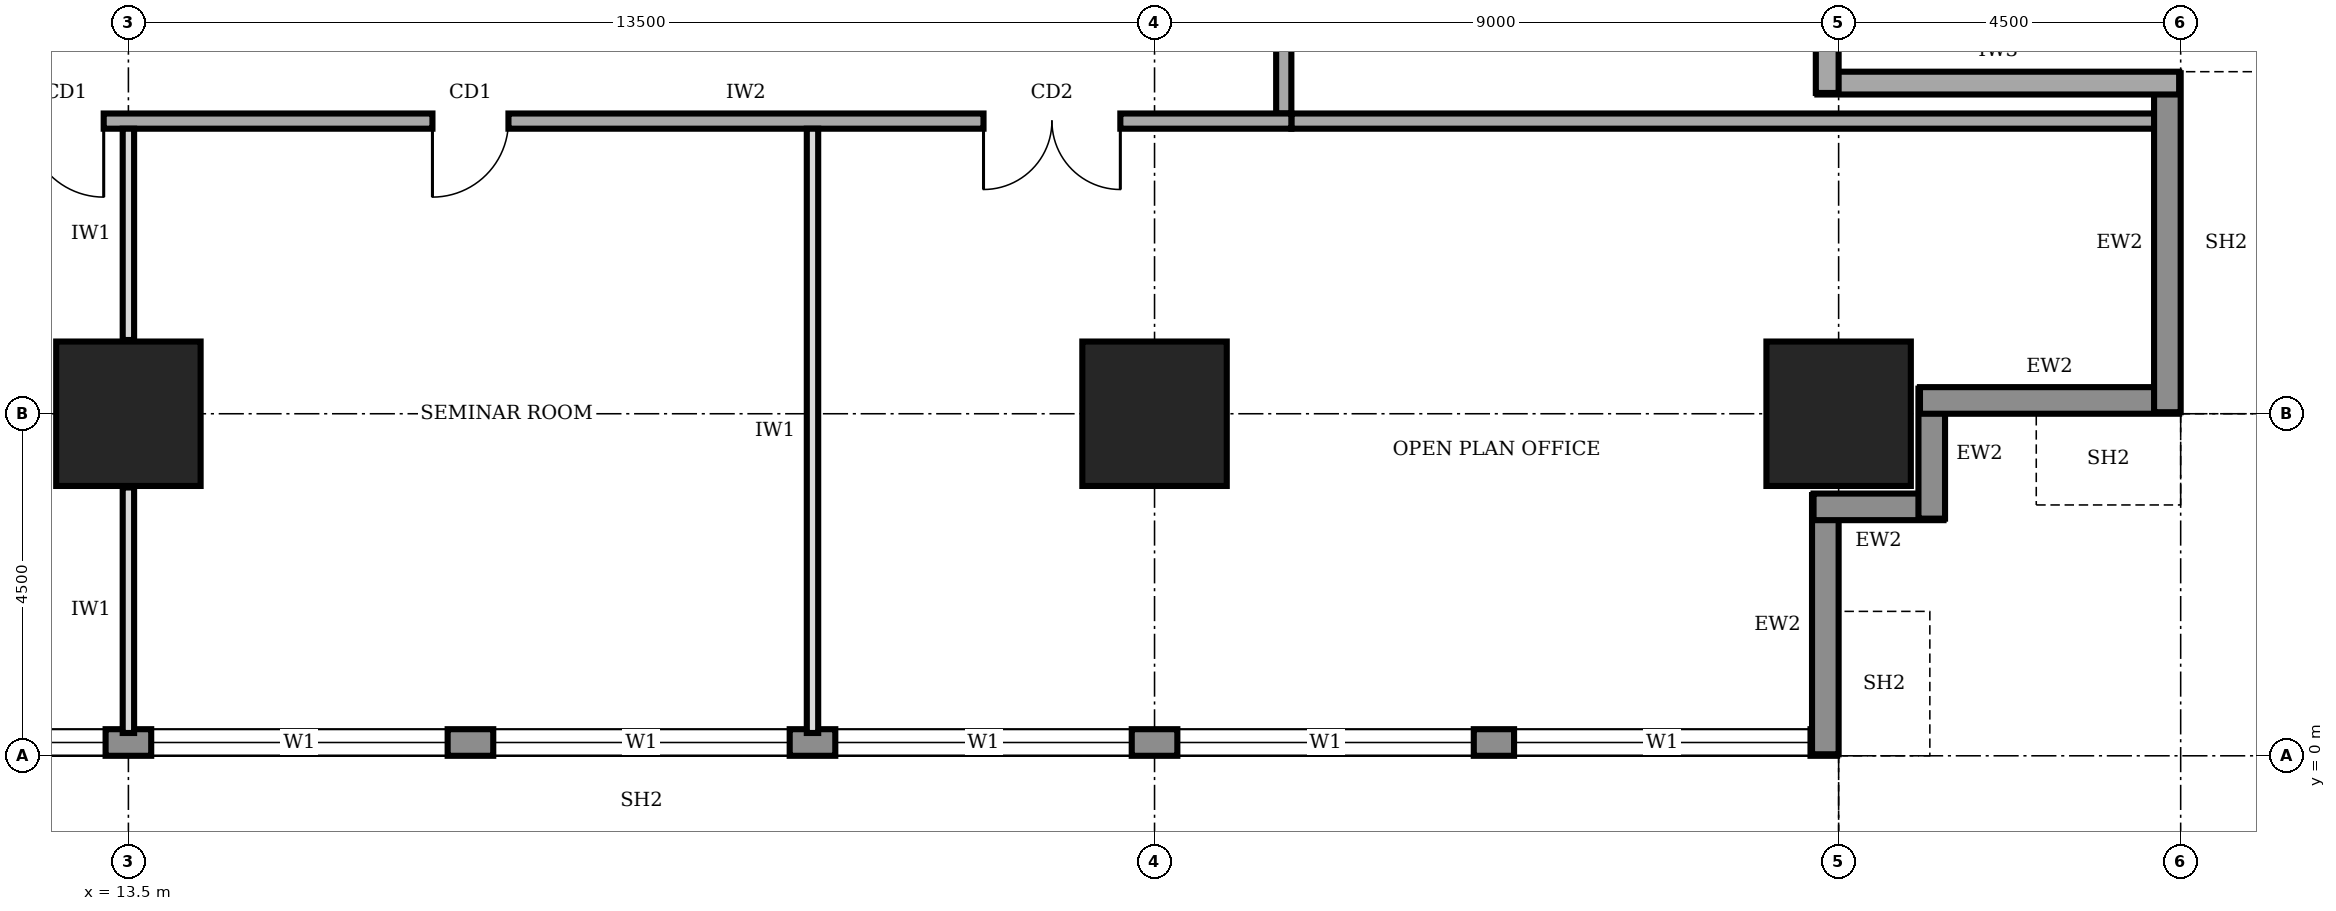
"""IFC4 building model, lengths in metres.
Left out: names, types, materials, properties, quantities, classifications, styles, units other than length and angle.
Written with IfcOpenShell. Run it as: python <this file> out.ifc"""

import sys

from ifc_helpers import new_model, si_unit, direction, frame, frame_2d, origin, origin_2d, place, context, subcontext, project, spatial, rectangle, extrude, element, fill, save


model = new_model("IFC4")
c1 = context("Model", 3, precision=1e-05, world=origin(), true_north=direction((0.0, 1.0)))
c2 = subcontext(c1, "Body", "Model", "MODEL_VIEW")
j1 = project(units=[si_unit("LENGTHUNIT", "METRE"), si_unit("PLANEANGLEUNIT", "RADIAN")], contexts=[c1])
p1 = place(None, origin())
s1 = spatial("IfcSite", under=j1, at=p1, CompositionType="ELEMENT")
p2 = place(p1, origin())
s2 = spatial("IfcBuilding", under=s1, at=p2, CompositionType="ELEMENT")
p3 = place(p2, frame((0.0, 0.0, 113.0)))
s3 = spatial("IfcBuildingStorey", under=s2, at=p3, CompositionType="ELEMENT", Elevation=113.0)
for number, where, z_axis, x_axis in (
    (1, (13.5, 4.5, 0.0), (0.0, 0.0, 1.0), (1.0, 0.0, 0.0)),
    (2, (27.0, 4.5, 0.0), (0.0, 0.0, 1.0), (1.0, 0.0, 0.0)),
    (3, (36.0, 4.5, 0.0), (0.0, 0.0, 1.0), (1.0, 0.0, 0.0)),
):
    element("IfcColumn", number, at=place(p3, frame(where, z_axis=z_axis, x_axis=x_axis)), inside=s3, PredefinedType="COLUMN", context=c2, shape_type="SweptSolid", body=[
        extrude(rectangle(XDim=1.9, YDim=1.9, at=origin_2d()), origin(), (0.0, 0.0, 1.0), 4.0),
    ])
p4 = place(p3, frame((4.52, 0.175, 0.0), z_axis=(0.0, 0.0, 1.0), x_axis=(1.0, 0.0, 0.0)))
e4 = element("IfcWall", 4, at=p4, inside=s3, PredefinedType="STANDARD", context=c2, shape_type="SweptSolid", body=[
    extrude(rectangle(XDim=31.46, YDim=0.35, at=frame_2d((15.73, 0.0))), origin(), (0.0, 0.0, 1.0), 3.75),
])
p5 = place(p4, frame((4.78, 0.0, 0.9)))
e5 = element("IfcOpeningElement", 5, at=p5, cuts=e4, PredefinedType="OPENING", context=c2, shape_type="SweptSolid", body=[
    extrude(rectangle(XDim=3.9, YDim=2.2, at=frame_2d((1.95, 1.1))), frame((0.0, 0.185, 0.0), z_axis=(0.0, -1.0, 0.0), x_axis=(1.0, 0.0, 0.0)), (0.0, 0.0, 1.0), 0.37),
])
p6 = place(p4, frame((9.28, 0.0, 0.9)))
e6 = element("IfcOpeningElement", 6, at=p6, cuts=e4, PredefinedType="OPENING", context=c2, shape_type="SweptSolid", body=[
    extrude(rectangle(XDim=3.9, YDim=2.2, at=frame_2d((1.95, 1.1))), frame((0.0, 0.185, 0.0), z_axis=(0.0, -1.0, 0.0), x_axis=(1.0, 0.0, 0.0)), (0.0, 0.0, 1.0), 0.37),
])
p7 = place(p4, frame((13.78, 0.0, 0.9)))
e7 = element("IfcOpeningElement", 7, at=p7, cuts=e4, PredefinedType="OPENING", context=c2, shape_type="SweptSolid", body=[
    extrude(rectangle(XDim=3.9, YDim=2.2, at=frame_2d((1.95, 1.1))), frame((0.0, 0.185, 0.0), z_axis=(0.0, -1.0, 0.0), x_axis=(1.0, 0.0, 0.0)), (0.0, 0.0, 1.0), 0.37),
])
p8 = place(p4, frame((18.28, 0.0, 0.9)))
e8 = element("IfcOpeningElement", 8, at=p8, cuts=e4, PredefinedType="OPENING", context=c2, shape_type="SweptSolid", body=[
    extrude(rectangle(XDim=3.9, YDim=2.2, at=frame_2d((1.95, 1.1))), frame((0.0, 0.185, 0.0), z_axis=(0.0, -1.0, 0.0), x_axis=(1.0, 0.0, 0.0)), (0.0, 0.0, 1.0), 0.37),
])
p9 = place(p4, frame((22.78, 0.0, 0.9)))
e9 = element("IfcOpeningElement", 9, at=p9, cuts=e4, PredefinedType="OPENING", context=c2, shape_type="SweptSolid", body=[
    extrude(rectangle(XDim=3.9, YDim=2.2, at=frame_2d((1.95, 1.1))), frame((0.0, 0.185, 0.0), z_axis=(0.0, -1.0, 0.0), x_axis=(1.0, 0.0, 0.0)), (0.0, 0.0, 1.0), 0.37),
])
p10 = place(p4, frame((27.21, 0.0, 0.9)))
e10 = element("IfcOpeningElement", 10, at=p10, cuts=e4, PredefinedType="OPENING", context=c2, shape_type="SweptSolid", body=[
    extrude(rectangle(XDim=3.9, YDim=2.2, at=frame_2d((1.95, 1.1))), frame((0.0, 0.185, 0.0), z_axis=(0.0, -1.0, 0.0), x_axis=(1.0, 0.0, 0.0)), (0.0, 0.0, 1.0), 0.37),
])
p11 = place(p3, frame((35.825, 0.02, 0.0), z_axis=(0.0, 0.0, 1.0), x_axis=(0.0, 1.0, 0.0)))
e11 = element("IfcWall", 11, at=p11, inside=s3, PredefinedType="STANDARD", context=c2, shape_type="SweptSolid", body=[
    extrude(rectangle(XDim=3.41, YDim=0.35, at=frame_2d((1.705, 0.0))), origin(), (0.0, 0.0, 1.0), 2.85),
])
for number, where, z_axis, x_axis in (
    (12, (35.67, 3.275, 0.0), (0.0, 0.0, 1.0), (1.0, 0.0, 0.0)),
    (13, (37.225, 3.12, 0.0), (0.0, 0.0, 1.0), (0.0, 1.0, 0.0)),
):
    element("IfcWall", number, at=place(p3, frame(where, z_axis=z_axis, x_axis=x_axis)), inside=s3, PredefinedType="STANDARD", context=c2, shape_type="SweptSolid", body=[
        extrude(rectangle(XDim=1.71, YDim=0.35, at=frame_2d((0.855, 0.0))), origin(), (0.0, 0.0, 1.0), 3.75),
    ])
p12 = place(p3, frame((37.07, 4.675, 0.0), z_axis=(0.0, 0.0, 1.0), x_axis=(1.0, 0.0, 0.0)))
e14 = element("IfcWall", 14, at=p12, inside=s3, PredefinedType="STANDARD", context=c2, shape_type="SweptSolid", body=[
    extrude(rectangle(XDim=3.41, YDim=0.35, at=frame_2d((1.705, 0.0))), origin(), (0.0, 0.0, 1.0), 2.85),
])
p13 = place(p3, frame((40.325, 4.52, 0.0), z_axis=(0.0, 0.0, 1.0), x_axis=(0.0, 1.0, 0.0)))
e15 = element("IfcWall", 15, at=p13, inside=s3, PredefinedType="STANDARD", context=c2, shape_type="SweptSolid", body=[
    extrude(rectangle(XDim=4.46, YDim=0.35, at=frame_2d((2.23, 0.0))), origin(), (0.0, 0.0, 1.0), 3.75),
])
p14 = place(p3, frame((40.48, 8.85, 0.0), z_axis=(0.0, 0.0, 1.0), x_axis=(-1.0, 0.0, 0.0)))
e16 = element("IfcWall", 16, at=p14, inside=s3, PredefinedType="SOLIDWALL", context=c2, shape_type="SweptSolid", body=[
    extrude(rectangle(XDim=4.76, YDim=0.3, at=frame_2d((2.38, 0.0))), origin(), (0.0, 0.0, 1.0), 3.75),
])
p15 = place(p3, frame((35.85, 8.72, 0.0), z_axis=(0.0, 0.0, 1.0), x_axis=(0.0, 1.0, 0.0)))
e17 = element("IfcWall", 17, at=p15, inside=s3, PredefinedType="SOLIDWALL", context=c2, shape_type="SweptSolid", body=[
    extrude(rectangle(XDim=1.38, YDim=0.3, at=frame_2d((0.69, 0.0))), origin(), (0.0, 0.0, 1.0), 2.65),
])
p16 = place(p3, frame((11.9, 8.35, 0.0), z_axis=(0.0, 0.0, 1.0), x_axis=(1.0, 0.0, 0.0)))
e18 = element("IfcWall", 18, at=p16, inside=s3, PredefinedType="SOLIDWALL", context=c2, shape_type="SweptSolid", body=[
    extrude(rectangle(XDim=16.9, YDim=0.2, at=frame_2d((8.45, 0.0))), origin(), (0.0, 0.0, 1.0), 3.75),
])
p17 = place(p16, frame((0.275, 0.0, 0.0)))
e19 = element("IfcOpeningElement", 19, at=p17, cuts=e18, PredefinedType="OPENING", context=c2, shape_type="SweptSolid", body=[
    extrude(rectangle(XDim=1.0, YDim=2.1, at=frame_2d((0.5, 1.05))), frame((0.0, 0.11, 0.0), z_axis=(0.0, -1.0, 0.0), x_axis=(1.0, 0.0, 0.0)), (0.0, 0.0, 1.0), 0.22),
])
p18 = place(p16, frame((5.6, 0.0, 0.0)))
e20 = element("IfcOpeningElement", 20, at=p18, cuts=e18, PredefinedType="OPENING", context=c2, shape_type="SweptSolid", body=[
    extrude(rectangle(XDim=1.0, YDim=2.1, at=frame_2d((0.5, 1.05))), frame((0.0, 0.11, 0.0), z_axis=(0.0, -1.0, 0.0), x_axis=(1.0, 0.0, 0.0)), (0.0, 0.0, 1.0), 0.22),
])
p19 = place(p16, frame((12.85, 0.0, 0.0)))
e21 = element("IfcOpeningElement", 21, at=p19, cuts=e18, PredefinedType="OPENING", context=c2, shape_type="SweptSolid", body=[
    extrude(rectangle(XDim=1.8, YDim=2.1, at=frame_2d((0.9, 1.05))), frame((0.0, 0.11, 0.0), z_axis=(0.0, -1.0, 0.0), x_axis=(1.0, 0.0, 0.0)), (0.0, 0.0, 1.0), 0.22),
])
p20 = place(p3, frame((28.7, 8.45, 0.0), z_axis=(0.0, 0.0, 1.0), x_axis=(0.0, 1.0, 0.0)))
e22 = element("IfcWall", 22, at=p20, inside=s3, PredefinedType="SOLIDWALL", context=c2, shape_type="SweptSolid", body=[
    extrude(rectangle(XDim=23.8, YDim=0.2, at=frame_2d((11.9, 0.0))), origin(), (0.0, 0.0, 1.0), 3.75),
])
p21 = place(p20, frame((10.9, 0.0, 0.0)))
e23 = element("IfcOpeningElement", 23, at=p21, cuts=e22, PredefinedType="OPENING", context=c2, shape_type="SweptSolid", body=[
    extrude(rectangle(XDim=1.8, YDim=2.1, at=frame_2d((0.9, 1.05))), frame((0.0, 0.11, 0.0), z_axis=(0.0, -1.0, 0.0), x_axis=(1.0, 0.0, 0.0)), (0.0, 0.0, 1.0), 0.22),
])
p22 = place(p3, frame((28.8, 8.35, 0.0), z_axis=(0.0, 0.0, 1.0), x_axis=(1.0, 0.0, 0.0)))
e24 = element("IfcWall", 24, at=p22, inside=s3, PredefinedType="SOLIDWALL", context=c2, shape_type="SweptSolid", body=[
    extrude(rectangle(XDim=11.4, YDim=0.2, at=frame_2d((5.7, 0.0))), origin(), (0.0, 0.0, 1.0), 3.75),
])
p23 = place(p3, frame((13.5, 0.3, 0.0), z_axis=(0.0, 0.0, 1.0), x_axis=(0.0, 1.0, 0.0)))
e25 = element("IfcWall", 25, at=p23, inside=s3, PredefinedType="PARTITIONING", context=c2, shape_type="SweptSolid", body=[
    extrude(rectangle(XDim=3.23, YDim=0.15, at=frame_2d((1.615, 0.0))), origin(), (0.0, 0.0, 1.0), 2.85),
])
p24 = place(p3, frame((13.5, 5.47, 0.0), z_axis=(0.0, 0.0, 1.0), x_axis=(0.0, 1.0, 0.0)))
e26 = element("IfcWall", 26, at=p24, inside=s3, PredefinedType="PARTITIONING", context=c2, shape_type="SweptSolid", body=[
    extrude(rectangle(XDim=2.78, YDim=0.15, at=frame_2d((1.39, 0.0))), origin(), (0.0, 0.0, 1.0), 2.85),
])
p25 = place(p3, frame((22.5, 0.3, 0.0), z_axis=(0.0, 0.0, 1.0), x_axis=(0.0, 1.0, 0.0)))
e27 = element("IfcWall", 27, at=p25, inside=s3, PredefinedType="PARTITIONING", context=c2, shape_type="SweptSolid", body=[
    extrude(rectangle(XDim=7.95, YDim=0.15, at=frame_2d((3.975, 0.0))), origin(), (0.0, 0.0, 1.0), 3.75),
])
p26 = place(p5, origin())
e28 = element("IfcWindow", 28, at=p26, inside=s3, PartitioningType="SINGLE_PANEL", PredefinedType="WINDOW", context=c2, shape_type="SweptSolid", body=[
    extrude(rectangle(XDim=3.9, YDim=2.2, at=frame_2d((1.95, 1.1))), frame((0.0, 0.03, 0.0), z_axis=(0.0, -1.0, 0.0), x_axis=(1.0, 0.0, 0.0)), (0.0, 0.0, 1.0), 0.06),
])
fill(e5, e28)
p27 = place(p6, origin())
e29 = element("IfcWindow", 29, at=p27, inside=s3, PartitioningType="SINGLE_PANEL", PredefinedType="WINDOW", context=c2, shape_type="SweptSolid", body=[
    extrude(rectangle(XDim=3.9, YDim=2.2, at=frame_2d((1.95, 1.1))), frame((0.0, 0.03, 0.0), z_axis=(0.0, -1.0, 0.0), x_axis=(1.0, 0.0, 0.0)), (0.0, 0.0, 1.0), 0.06),
])
fill(e6, e29)
p28 = place(p7, origin())
e30 = element("IfcWindow", 30, at=p28, inside=s3, PartitioningType="SINGLE_PANEL", PredefinedType="WINDOW", context=c2, shape_type="SweptSolid", body=[
    extrude(rectangle(XDim=3.9, YDim=2.2, at=frame_2d((1.95, 1.1))), frame((0.0, 0.03, 0.0), z_axis=(0.0, -1.0, 0.0), x_axis=(1.0, 0.0, 0.0)), (0.0, 0.0, 1.0), 0.06),
])
fill(e7, e30)
p29 = place(p8, origin())
e31 = element("IfcWindow", 31, at=p29, inside=s3, PartitioningType="SINGLE_PANEL", PredefinedType="WINDOW", context=c2, shape_type="SweptSolid", body=[
    extrude(rectangle(XDim=3.9, YDim=2.2, at=frame_2d((1.95, 1.1))), frame((0.0, 0.03, 0.0), z_axis=(0.0, -1.0, 0.0), x_axis=(1.0, 0.0, 0.0)), (0.0, 0.0, 1.0), 0.06),
])
fill(e8, e31)
p30 = place(p9, origin())
e32 = element("IfcWindow", 32, at=p30, inside=s3, PartitioningType="SINGLE_PANEL", PredefinedType="WINDOW", context=c2, shape_type="SweptSolid", body=[
    extrude(rectangle(XDim=3.9, YDim=2.2, at=frame_2d((1.95, 1.1))), frame((0.0, 0.03, 0.0), z_axis=(0.0, -1.0, 0.0), x_axis=(1.0, 0.0, 0.0)), (0.0, 0.0, 1.0), 0.06),
])
fill(e9, e32)
p31 = place(p10, origin())
e33 = element("IfcWindow", 33, at=p31, inside=s3, PartitioningType="SINGLE_PANEL", PredefinedType="WINDOW", context=c2, shape_type="SweptSolid", body=[
    extrude(rectangle(XDim=3.9, YDim=2.2, at=frame_2d((1.95, 1.1))), frame((0.0, 0.03, 0.0), z_axis=(0.0, -1.0, 0.0), x_axis=(1.0, 0.0, 0.0)), (0.0, 0.0, 1.0), 0.06),
])
fill(e10, e33)
p32 = place(p17, frame((1.0, 0.0, 0.0), z_axis=(0.0, 0.0, 1.0), x_axis=(-1.0, 0.0, 0.0)))
e34 = element("IfcDoor", 34, at=p32, inside=s3, OperationType="SINGLE_SWING_LEFT", PredefinedType="DOOR", context=c2, shape_type="SweptSolid", body=[
    extrude(rectangle(XDim=1.0, YDim=2.1, at=frame_2d((0.5, 1.05))), frame((0.0, 0.025, 0.0), z_axis=(0.0, -1.0, 0.0), x_axis=(1.0, 0.0, 0.0)), (0.0, 0.0, 1.0), 0.05),
])
fill(e19, e34)
p33 = place(p18, frame((1.0, 0.0, 0.0), z_axis=(0.0, 0.0, 1.0), x_axis=(-1.0, 0.0, 0.0)))
e35 = element("IfcDoor", 35, at=p33, inside=s3, OperationType="SINGLE_SWING_RIGHT", PredefinedType="DOOR", context=c2, shape_type="SweptSolid", body=[
    extrude(rectangle(XDim=1.0, YDim=2.1, at=frame_2d((0.5, 1.05))), frame((0.0, 0.025, 0.0), z_axis=(0.0, -1.0, 0.0), x_axis=(1.0, 0.0, 0.0)), (0.0, 0.0, 1.0), 0.05),
])
fill(e20, e35)
p34 = place(p19, frame((1.8, 0.0, 0.0), z_axis=(0.0, 0.0, 1.0), x_axis=(-1.0, 0.0, 0.0)))
e36 = element("IfcDoor", 36, at=p34, inside=s3, OperationType="DOUBLE_DOOR_SINGLE_SWING", PredefinedType="DOOR", context=c2, shape_type="SweptSolid", body=[
    extrude(rectangle(XDim=1.8, YDim=2.1, at=frame_2d((0.9, 1.05))), frame((0.0, 0.025, 0.0), z_axis=(0.0, -1.0, 0.0), x_axis=(1.0, 0.0, 0.0)), (0.0, 0.0, 1.0), 0.05),
])
fill(e21, e36)
save(model, sys.argv[1])
